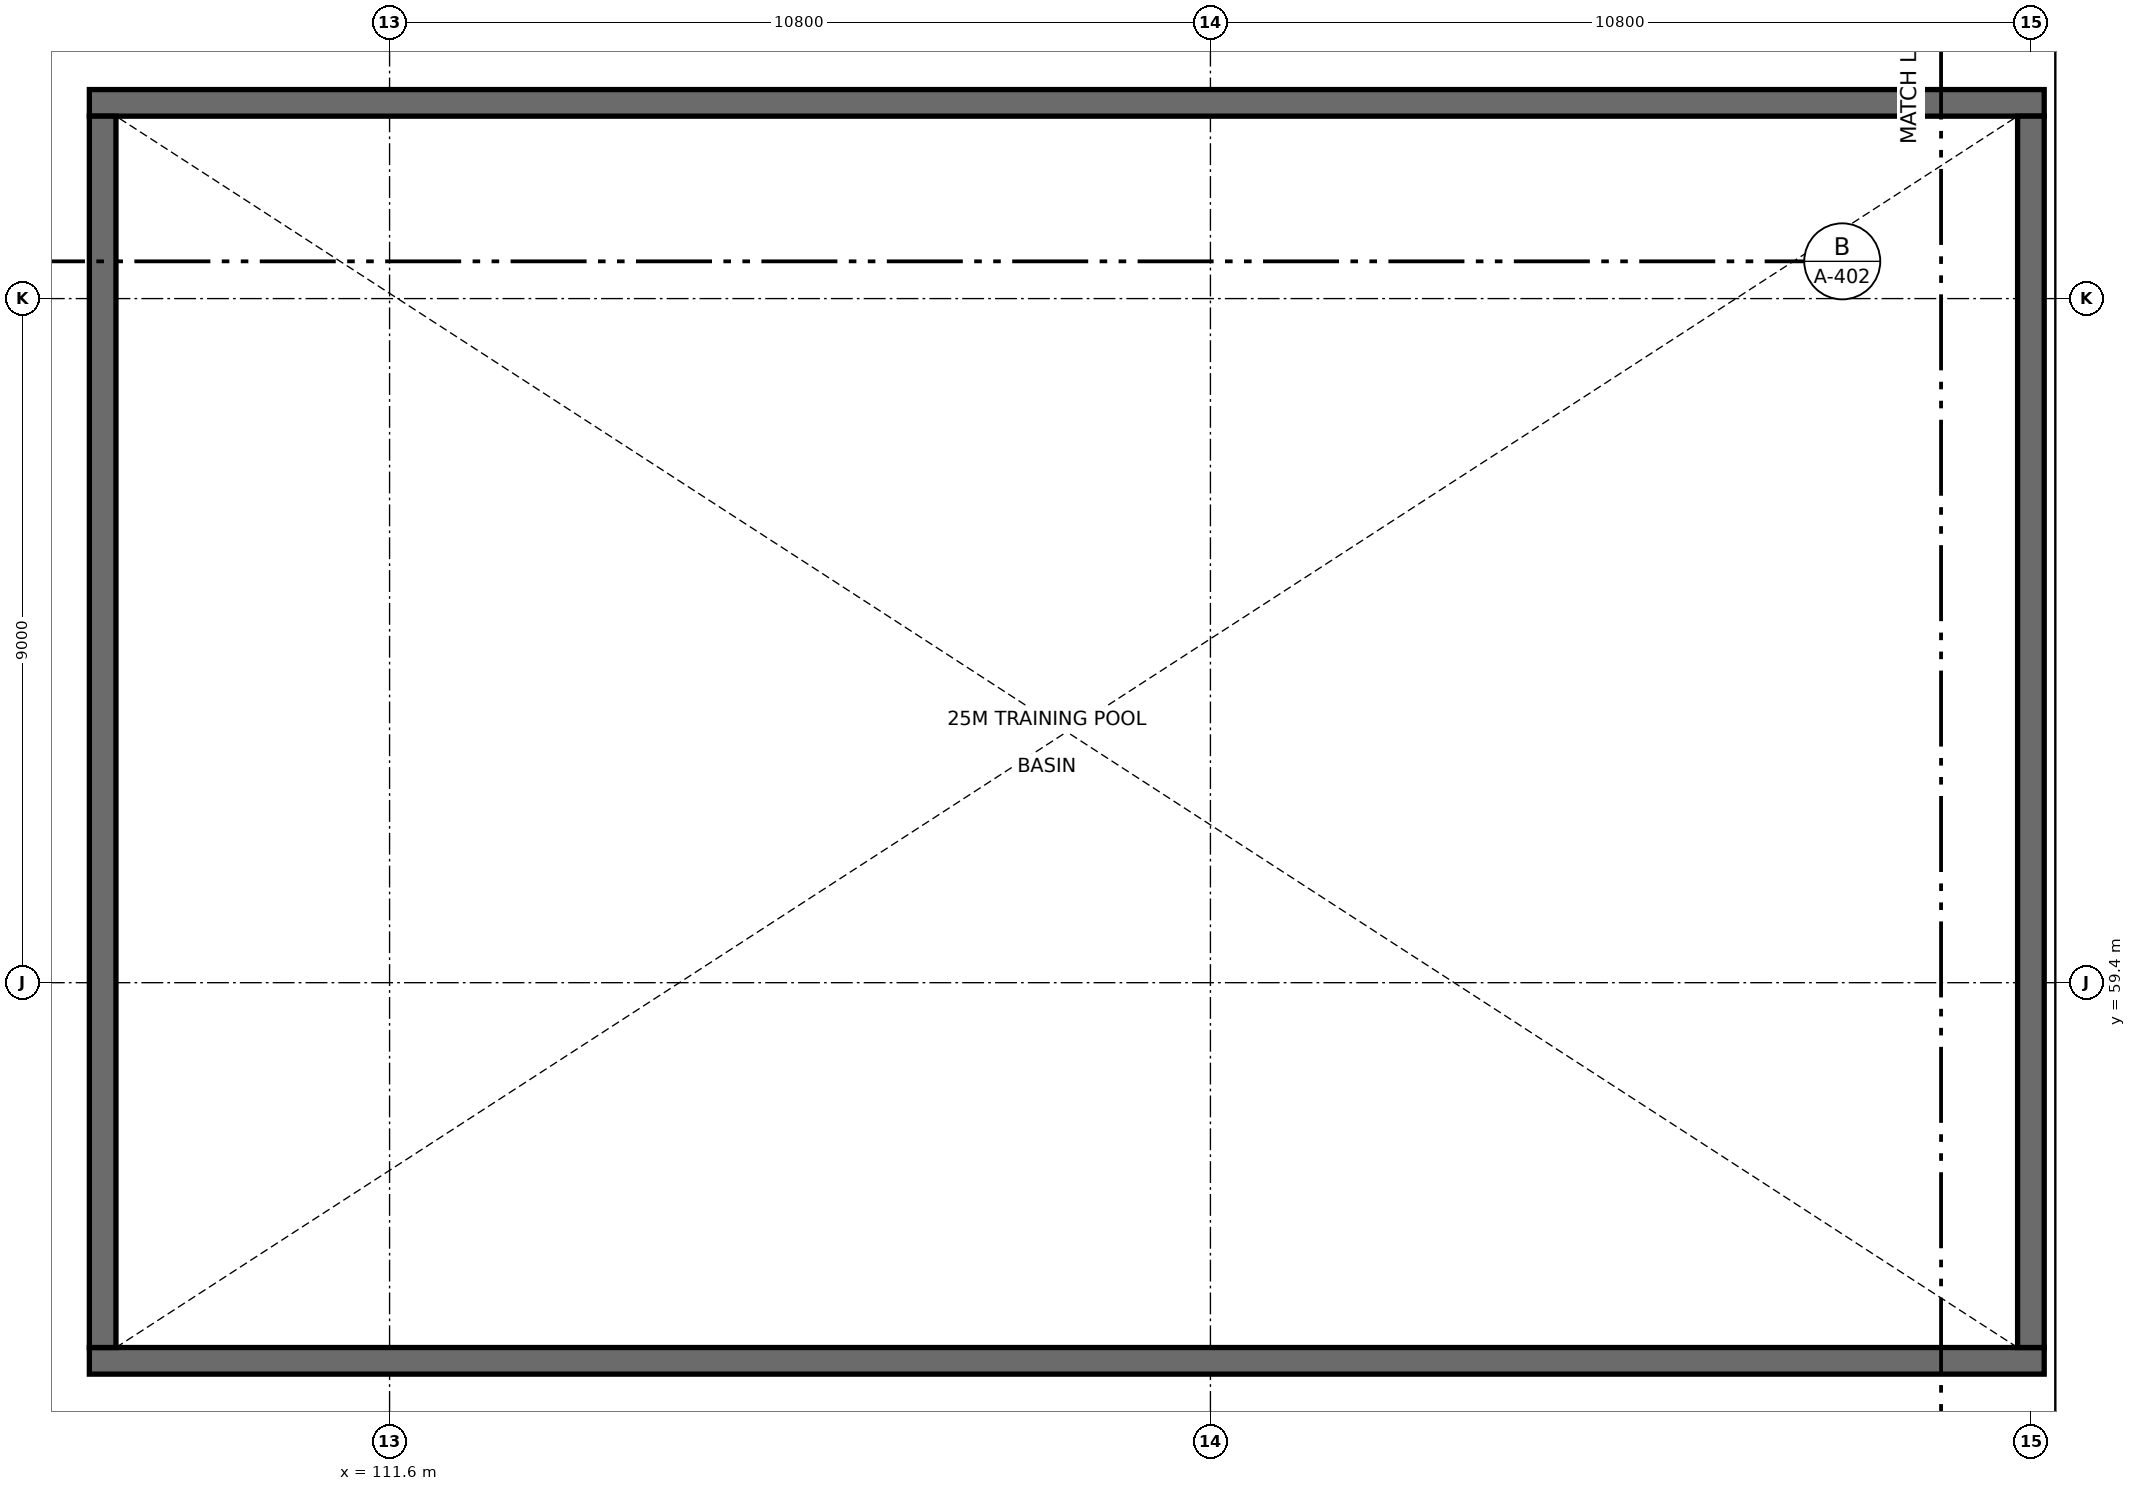
"""IFC4 building model, lengths in metres.
Left out: names, types, materials, properties, quantities, classifications, styles, units other than length and angle.
Written with IfcOpenShell. Run it as: python <this file> out.ifc"""

import sys

from ifc_helpers import new_model, si_unit, direction, frame, frame_2d, origin, place, context, subcontext, project, spatial, rectangle, extrude, element, save


model = new_model("IFC4")
c1 = context("Model", 3, precision=1e-05, world=origin(), true_north=direction((0.0, 1.0)))
c2 = subcontext(c1, "Body", "Model", "MODEL_VIEW")
j1 = project(units=[si_unit("LENGTHUNIT", "METRE"), si_unit("PLANEANGLEUNIT", "RADIAN")], contexts=[c1])
p1 = place(None, origin())
s1 = spatial("IfcSite", under=j1, at=p1, CompositionType="ELEMENT")
p2 = place(p1, origin())
s2 = spatial("IfcBuilding", under=s1, at=p2, CompositionType="ELEMENT")
p3 = place(p2, origin())
s3 = spatial("IfcBuildingStorey", under=s2, at=p3, CompositionType="ELEMENT", Elevation=0.0)
for number, where, z_axis, x_axis in (
    (1, (107.65, 54.425, -2.0), (0.0, 0.0, 1.0), (1.0, 0.0, 0.0)),
    (2, (107.65, 70.975, -2.0), (0.0, 0.0, 1.0), (1.0, 0.0, 0.0)),
):
    element("IfcWall", number, at=place(p3, frame(where, z_axis=z_axis, x_axis=x_axis)), inside=s3, PredefinedType="USERDEFINED", context=c2, shape_type="SweptSolid", body=[
        extrude(rectangle(XDim=25.72, YDim=0.35, at=frame_2d((12.86, 0.0))), origin(), (0.0, 0.0, 1.0), 2.08),
    ])
for number, where, z_axis, x_axis in (
    (3, (107.825, 54.6, -2.0), (0.0, 0.0, 1.0), (0.0, 1.0, 0.0)),
    (4, (133.195, 54.6, -2.0), (0.0, 0.0, 1.0), (0.0, 1.0, 0.0)),
):
    element("IfcWall", number, at=place(p3, frame(where, z_axis=z_axis, x_axis=x_axis)), inside=s3, PredefinedType="USERDEFINED", context=c2, shape_type="SweptSolid", body=[
        extrude(rectangle(XDim=16.2, YDim=0.35, at=frame_2d((8.1, 0.0))), origin(), (0.0, 0.0, 1.0), 2.08),
    ])
save(model, sys.argv[1])
